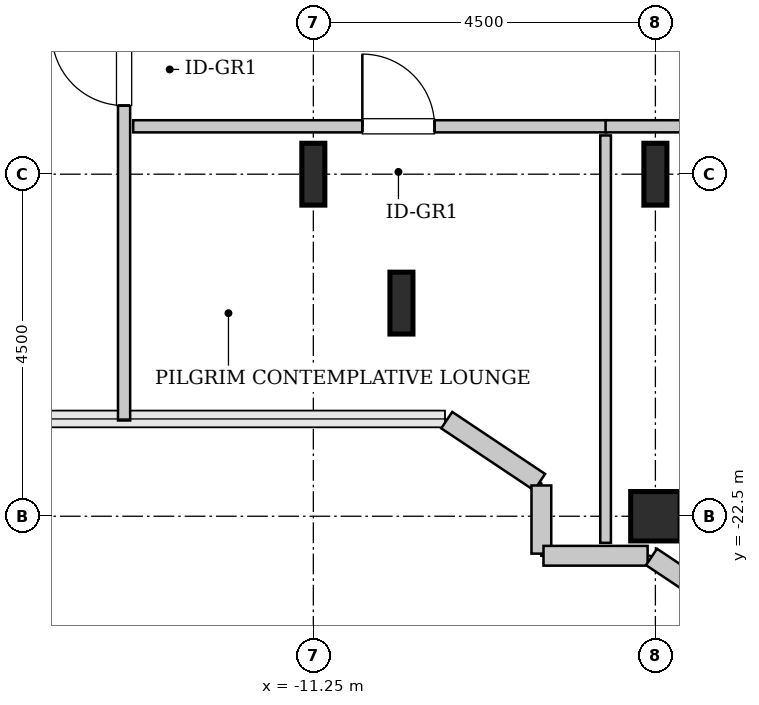
"""IFC4 building model, lengths in metres.
Left out: names, types, materials, properties, quantities, classifications, styles, units other than length and angle.
Written with IfcOpenShell. Run it as: python <this file> out.ifc"""

import sys

from ifc_helpers import new_model, si_unit, direction, frame, frame_2d, origin, origin_2d, place, context, subcontext, project, spatial, rectangle, hollow_rectangle, i_section, extrude, source, transform, mapped, element, fill, save


model = new_model("IFC4")
c1 = context("Model", 3, precision=1e-05, world=origin(), true_north=direction((0.0, 1.0)))
c2 = subcontext(c1, "Body", "Model", "MODEL_VIEW")
j1 = project(units=[si_unit("LENGTHUNIT", "METRE"), si_unit("PLANEANGLEUNIT", "RADIAN")], contexts=[c1])
p1 = place(None, origin())
s1 = spatial("IfcSite", under=j1, at=p1, CompositionType="ELEMENT")
p2 = place(p1, origin())
s2 = spatial("IfcBuilding", under=s1, at=p2, CompositionType="ELEMENT")
p3 = place(p2, frame((0.0, 0.0, 244.6)))
s3 = spatial("IfcBuildingStorey", under=s2, at=p3, CompositionType="ELEMENT", Elevation=244.6)
m1 = source(origin(), c2, "Body", "SweptSolid", [
    extrude(i_section(OverallWidth=0.303, OverallDepth=0.814, WebThickness=0.021, FlangeThickness=0.04, FilletRadius=0.03, at=origin_2d()), origin(), (0.0, 0.0, 1.0), 3.8),
])
for number, where, z_axis, x_axis in (
    (1, (-11.25, -18.0, 0.0), (0.0, 0.0, 1.0), (1.0, 0.0, 0.0)),
    (2, (-10.091, -19.696, 0.0), (0.0, 0.0, 1.0), (1.0, 0.0, 0.0)),
):
    element("IfcColumn", number, at=place(p3, frame(where, z_axis=z_axis, x_axis=x_axis)), inside=s3, PredefinedType="COLUMN", context=c2, shape_type="MappedRepresentation", body=[
        mapped(m1, transform((0.0, 0.0, 0.0), x_axis=(1.0, 0.0, 0.0), y_axis=(0.0, 1.0, 0.0), z_axis=(0.0, 0.0, 1.0), scale=1.0)),
    ])
m2 = source(origin(), c2, "Body", "SweptSolid", [
    extrude(hollow_rectangle(XDim=0.65, YDim=0.65, WallThickness=0.032, InnerFilletRadius=0.032, OuterFilletRadius=0.064, at=origin_2d()), origin(), (0.0, 0.0, 1.0), 3.8),
])
p4 = place(p3, frame((-6.75, -22.5, 0.0), z_axis=(0.0, 0.0, 1.0), x_axis=(1.0, 0.0, 0.0)))
e3 = element("IfcColumn", 3, at=p4, inside=s3, PredefinedType="COLUMN", context=c2, shape_type="MappedRepresentation", body=[
    mapped(m2, transform((0.0, 0.0, 0.0), x_axis=(1.0, 0.0, 0.0), y_axis=(0.0, 1.0, 0.0), z_axis=(0.0, 0.0, 1.0), scale=1.0)),
])
p5 = place(p3, frame((-6.75, -18.0, 0.0), z_axis=(0.0, 0.0, 1.0), x_axis=(1.0, 0.0, 0.0)))
e4 = element("IfcColumn", 4, at=p5, inside=s3, PredefinedType="COLUMN", context=c2, shape_type="MappedRepresentation", body=[
    mapped(m1, transform((0.0, 0.0, 0.0), x_axis=(1.0, 0.0, 0.0), y_axis=(0.0, 1.0, 0.0), z_axis=(0.0, 0.0, 1.0), scale=1.0)),
])
m3 = source(origin(), c2, "Body", "SweptSolid", [
    extrude(rectangle(XDim=1.469, YDim=0.26, at=frame_2d((0.734, 0.0))), origin(), (0.0, 0.0, 1.0), 3.55),
])
p6 = place(p3, frame((-9.495, -21.236, 0.0), z_axis=(0.0, 0.0, 1.0), x_axis=(0.831461760506, -0.555581983884, 0.0)))
e5 = element("IfcWall", 5, at=p6, inside=s3, PredefinedType="SOLIDWALL", context=c2, shape_type="MappedRepresentation", body=[
    mapped(m3, transform((0.0, 0.0, 0.0), x_axis=(1.0, 0.0, 0.0), y_axis=(0.0, 1.0, 0.0), z_axis=(0.0, 0.0, 1.0), scale=1.0)),
])
m4 = source(origin(), c2, "Body", "SweptSolid", [
    extrude(rectangle(XDim=0.897, YDim=0.26, at=frame_2d((0.448, 0.0))), origin(), (0.0, 0.0, 1.0), 3.55),
])
p7 = place(p3, frame((-8.25, -22.095, 0.0), z_axis=(0.0, 0.0, 1.0), x_axis=(0.0, -1.0, 0.0)))
e6 = element("IfcWall", 6, at=p7, inside=s3, PredefinedType="SOLIDWALL", context=c2, shape_type="MappedRepresentation", body=[
    mapped(m4, transform((0.0, 0.0, 0.0), x_axis=(1.0, 0.0, 0.0), y_axis=(0.0, 1.0, 0.0), z_axis=(0.0, 0.0, 1.0), scale=1.0)),
])
m5 = source(origin(), c2, "Body", "SweptSolid", [
    extrude(rectangle(XDim=1.37, YDim=0.26, at=frame_2d((0.685, 0.0))), origin(), (0.0, 0.0, 1.0), 3.55),
])
p8 = place(p3, frame((-8.222, -23.02, 0.0), z_axis=(0.0, 0.0, 1.0), x_axis=(1.0, 0.0, 0.0)))
e7 = element("IfcWall", 7, at=p8, inside=s3, PredefinedType="SOLIDWALL", context=c2, shape_type="MappedRepresentation", body=[
    mapped(m5, transform((0.0, 0.0, 0.0), x_axis=(1.0, 0.0, 0.0), y_axis=(0.0, 1.0, 0.0), z_axis=(0.0, 0.0, 1.0), scale=1.0)),
])
m6 = source(origin(), c2, "Body", "SweptSolid", [
    extrude(rectangle(XDim=0.565, YDim=0.26, at=frame_2d((0.283, 0.0))), origin(), (0.0, 0.0, 1.0), 3.55),
])
p9 = place(p3, frame((-6.801, -23.036, 0.0), z_axis=(0.0, 0.0, 1.0), x_axis=(0.831651492666, -0.555297933317, 0.0)))
e8 = element("IfcWall", 8, at=p9, inside=s3, PredefinedType="SOLIDWALL", context=c2, shape_type="MappedRepresentation", body=[
    mapped(m6, transform((0.0, 0.0, 0.0), x_axis=(1.0, 0.0, 0.0), y_axis=(0.0, 1.0, 0.0), z_axis=(0.0, 0.0, 1.0), scale=1.0)),
])
m7 = source(origin(), c2, "Body", "SweptSolid", [
    extrude(rectangle(XDim=5.406, YDim=0.16, at=frame_2d((2.703, 0.0))), origin(), (0.0, 0.0, 1.0), 3.535),
])
p10 = place(p3, frame((-13.74, -21.24, 0.0), z_axis=(0.0, 0.0, 1.0), x_axis=(0.0, 1.0, 0.0)))
e9 = element("IfcWall", 9, at=p10, inside=s3, PredefinedType="PARTITIONING", context=c2, shape_type="MappedRepresentation", body=[
    mapped(m7, transform((0.0, 0.0, 0.0), x_axis=(1.0, 0.0, 0.0), y_axis=(0.0, 1.0, 0.0), z_axis=(0.0, 0.0, 1.0), scale=1.0)),
])
p11 = place(p10, frame((4.143, 0.0, 0.0)))
e10 = element("IfcOpeningElement", 10, at=p11, cuts=e9, PredefinedType="OPENING", context=c2, shape_type="SweptSolid", body=[
    extrude(rectangle(XDim=0.95, YDim=2.1, at=frame_2d((0.475, 1.05))), frame((0.0, 0.09, 0.0), z_axis=(0.0, -1.0, 0.0), x_axis=(1.0, 0.0, 0.0)), (0.0, 0.0, 1.0), 0.18),
])
m8 = source(origin(), c2, "Body", "SweptSolid", [
    extrude(rectangle(XDim=6.225, YDim=0.16, at=frame_2d((3.113, 0.0))), origin(), (0.0, 0.0, 1.0), 3.535),
])
p12 = place(p3, frame((-13.62, -17.37, 0.0), z_axis=(0.0, 0.0, 1.0), x_axis=(1.0, 0.0, 0.0)))
e11 = element("IfcWall", 11, at=p12, inside=s3, PredefinedType="PARTITIONING", context=c2, shape_type="MappedRepresentation", body=[
    mapped(m8, transform((0.0, 0.0, 0.0), x_axis=(1.0, 0.0, 0.0), y_axis=(0.0, 1.0, 0.0), z_axis=(0.0, 0.0, 1.0), scale=1.0)),
])
p13 = place(p12, frame((3.015, 0.0, 0.0)))
e12 = element("IfcOpeningElement", 12, at=p13, cuts=e11, PredefinedType="OPENING", context=c2, shape_type="SweptSolid", body=[
    extrude(rectangle(XDim=0.95, YDim=2.1, at=frame_2d((0.475, 1.05))), frame((0.0, 0.09, 0.0), z_axis=(0.0, -1.0, 0.0), x_axis=(1.0, 0.0, 0.0)), (0.0, 0.0, 1.0), 0.18),
])
m9 = source(origin(), c2, "Body", "SweptSolid", [
    extrude(rectangle(XDim=5.36, YDim=0.14, at=frame_2d((2.68, 0.0))), origin(), (0.0, 0.0, 1.0), 3.535),
])
p14 = place(p3, frame((-7.405, -22.85, 0.0), z_axis=(0.0, 0.0, 1.0), x_axis=(0.0, 1.0, 0.0)))
e13 = element("IfcWall", 13, at=p14, inside=s3, PredefinedType="PARTITIONING", context=c2, shape_type="MappedRepresentation", body=[
    mapped(m9, transform((0.0, 0.0, 0.0), x_axis=(1.0, 0.0, 0.0), y_axis=(0.0, 1.0, 0.0), z_axis=(0.0, 0.0, 1.0), scale=1.0)),
])
m10 = source(origin(), c2, "Body", "SweptSolid", [
    extrude(rectangle(XDim=12.21, YDim=0.16, at=frame_2d((6.105, 0.0))), origin(), (0.0, 0.0, 1.0), 3.535),
])
p15 = place(p3, frame((-7.405, -17.37, 0.0), z_axis=(0.0, 0.0, 1.0), x_axis=(1.0, 0.0, 0.0)))
e14 = element("IfcWall", 14, at=p15, inside=s3, PredefinedType="PARTITIONING", context=c2, shape_type="MappedRepresentation", body=[
    mapped(m10, transform((0.0, 0.0, 0.0), x_axis=(1.0, 0.0, 0.0), y_axis=(0.0, 1.0, 0.0), z_axis=(0.0, 0.0, 1.0), scale=1.0)),
])
p16 = place(p15, frame((5.63, 0.0, 0.0)))
e15 = element("IfcOpeningElement", 15, at=p16, cuts=e14, PredefinedType="OPENING", context=c2, shape_type="SweptSolid", body=[
    extrude(rectangle(XDim=0.95, YDim=2.1, at=frame_2d((0.475, 1.05))), frame((0.0, 0.09, 0.0), z_axis=(0.0, -1.0, 0.0), x_axis=(1.0, 0.0, 0.0)), (0.0, 0.0, 1.0), 0.18),
])
m11 = source(origin(), c2, "Body", "SweptSolid", [
    extrude(rectangle(XDim=0.95, YDim=2.1, at=frame_2d((0.475, 1.05))), frame((0.0, 0.025, 0.0), z_axis=(0.0, -1.0, 0.0), x_axis=(1.0, 0.0, 0.0)), (0.0, 0.0, 1.0), 0.05),
])
p17 = place(p11, origin())
e16 = element("IfcDoor", 16, at=p17, inside=s3, OperationType="SINGLE_SWING_RIGHT", PredefinedType="DOOR", context=c2, shape_type="MappedRepresentation", body=[
    mapped(m11, transform((0.0, 0.0, 0.0), x_axis=(1.0, 0.0, 0.0), y_axis=(0.0, 1.0, 0.0), z_axis=(0.0, 0.0, 1.0), scale=1.0)),
])
fill(e10, e16)
p18 = place(p13, origin())
e17 = element("IfcDoor", 17, at=p18, inside=s3, OperationType="SINGLE_SWING_LEFT", PredefinedType="DOOR", context=c2, shape_type="MappedRepresentation", body=[
    mapped(m11, transform((0.0, 0.0, 0.0), x_axis=(1.0, 0.0, 0.0), y_axis=(0.0, 1.0, 0.0), z_axis=(0.0, 0.0, 1.0), scale=1.0)),
])
fill(e12, e17)
save(model, sys.argv[1])
